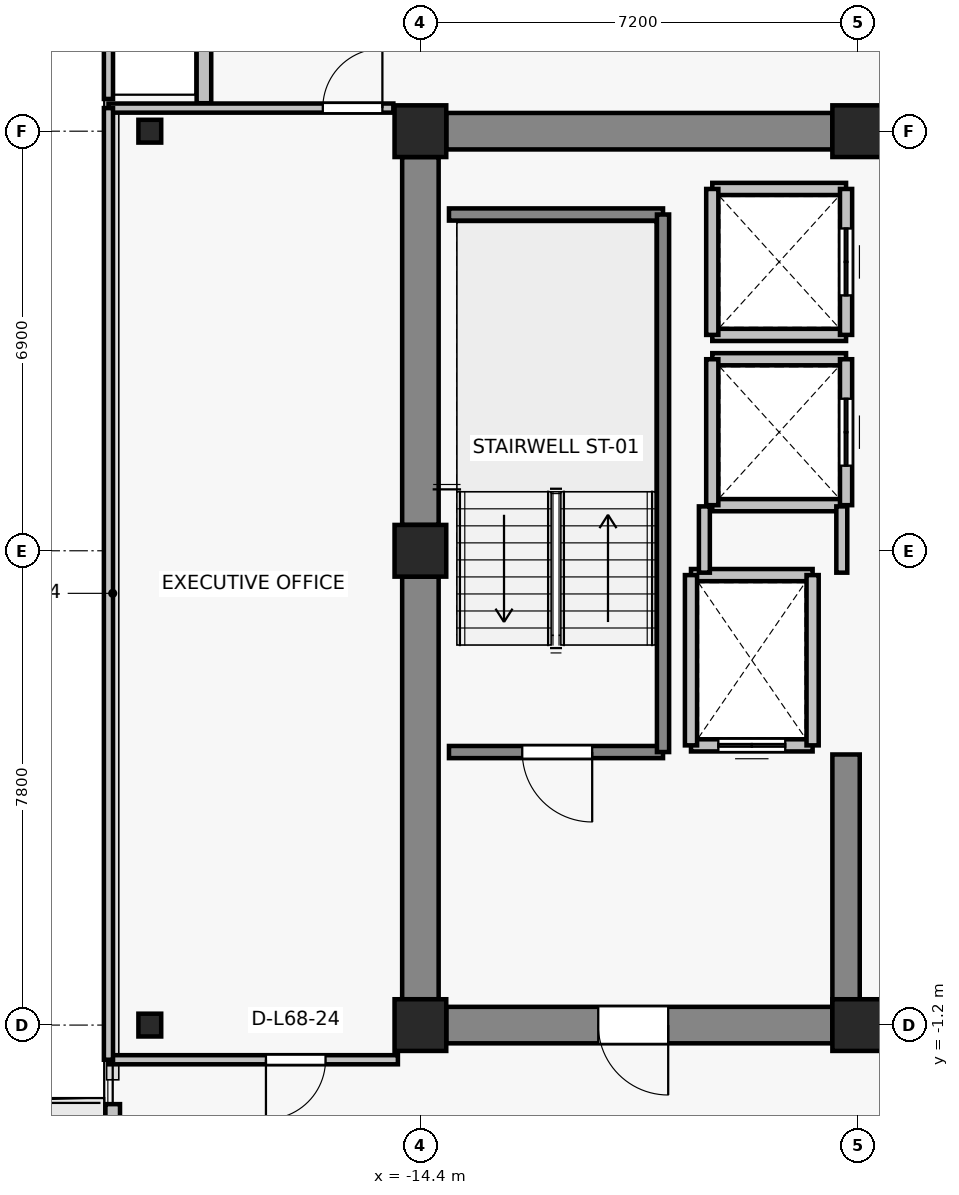
"""IFC4 building model, lengths in metres.
Left out: names, types, materials, properties, quantities, classifications, styles, units other than length and angle.
Written with IfcOpenShell. Run it as: python <this file> out.ifc"""

import sys

from ifc_helpers import new_model, si_unit, direction, frame, frame_2d, origin, origin_2d, place, context, subcontext, project, spatial, rectangle, i_section, extrude, source, transform, mapped, element, fill, save


model = new_model("IFC4")
c1 = context("Model", 3, precision=1e-05, world=origin(), true_north=direction((0.0, 1.0)))
c2 = subcontext(c1, "Body", "Model", "MODEL_VIEW")
j1 = project(units=[si_unit("LENGTHUNIT", "METRE"), si_unit("PLANEANGLEUNIT", "RADIAN")], contexts=[c1])
p1 = place(None, origin())
s1 = spatial("IfcSite", under=j1, at=p1, CompositionType="ELEMENT")
p2 = place(p1, origin())
s2 = spatial("IfcBuilding", under=s1, at=p2, CompositionType="ELEMENT")
p3 = place(p2, frame((0.0, 0.0, 241.9)))
s3 = spatial("IfcBuildingStorey", under=s2, at=p3, CompositionType="ELEMENT", Elevation=241.9)
for number, where, z_axis, x_axis in (
    (1, (-14.4, -1.2, 0.0), (0.0, 0.0, 1.0), (1.0, 0.0, 0.0)),
    (2, (-7.2, -1.2, 0.0), (0.0, 0.0, 1.0), (1.0, 0.0, 0.0)),
    (3, (-14.4, 6.6, 0.0), (0.0, 0.0, 1.0), (1.0, 0.0, 0.0)),
    (4, (-14.4, 13.5, 0.0), (0.0, 0.0, 1.0), (1.0, 0.0, 0.0)),
    (5, (-7.2, 13.5, 0.0), (0.0, 0.0, 1.0), (1.0, 0.0, 0.0)),
):
    element("IfcColumn", number, at=place(p3, frame(where, z_axis=z_axis, x_axis=x_axis)), inside=s3, PredefinedType="COLUMN", context=c2, shape_type="SweptSolid", body=[
        extrude(rectangle(XDim=0.85, YDim=0.85, at=origin_2d()), origin(), (0.0, 0.0, 1.0), 3.3),
    ])
for number, where, z_axis, x_axis in (
    (6, (-18.85, -1.2, 0.0), (0.0, 0.0, 1.0), (1.0, 0.0, 0.0)),
    (7, (-18.85, 13.5, 0.0), (0.0, 0.0, 1.0), (1.0, 0.0, 0.0)),
):
    element("IfcColumn", number, at=place(p3, frame(where, z_axis=z_axis, x_axis=x_axis)), inside=s3, PredefinedType="COLUMN", context=c2, shape_type="SweptSolid", body=[
        extrude(i_section(OverallWidth=0.375, OverallDepth=0.375, WebThickness=0.017, FlangeThickness=0.027, FilletRadius=0.015, at=origin_2d()), origin(), (0.0, 0.0, 1.0), 3.3),
    ])
p4 = place(p3, frame((-13.975, 13.5, 0.0), z_axis=(0.0, 0.0, 1.0), x_axis=(1.0, 0.0, 0.0)))
e8 = element("IfcWall", 8, at=p4, inside=s3, PredefinedType="SHEAR", context=c2, shape_type="SweptSolid", body=[
    extrude(rectangle(XDim=6.35, YDim=0.6, at=frame_2d((3.175, 0.0))), origin(), (0.0, 0.0, 1.0), 3.075),
])
p5 = place(p3, frame((-14.4, -0.775, 0.0), z_axis=(0.0, 0.0, 1.0), x_axis=(0.0, 1.0, 0.0)))
e9 = element("IfcWall", 9, at=p5, inside=s3, PredefinedType="SHEAR", context=c2, shape_type="SweptSolid", body=[
    extrude(rectangle(XDim=6.95, YDim=0.6, at=frame_2d((3.475, 0.0))), origin(), (0.0, 0.0, 1.0), 3.075),
])
p6 = place(p3, frame((-14.4, 7.025, 0.0), z_axis=(0.0, 0.0, 1.0), x_axis=(0.0, 1.0, 0.0)))
e10 = element("IfcWall", 10, at=p6, inside=s3, PredefinedType="SHEAR", context=c2, shape_type="SweptSolid", body=[
    extrude(rectangle(XDim=6.05, YDim=0.6, at=frame_2d((3.025, 0.0))), origin(), (0.0, 0.0, 1.0), 3.075),
])
p7 = place(p3, frame((-7.625, -1.2, 0.0), z_axis=(0.0, 0.0, 1.0), x_axis=(-1.0, 0.0, 0.0)))
e11 = element("IfcWall", 11, at=p7, inside=s3, PredefinedType="SHEAR", context=c2, shape_type="SweptSolid", body=[
    extrude(rectangle(XDim=6.35, YDim=0.6, at=frame_2d((3.175, 0.0))), origin(), (0.0, 0.0, 1.0), 3.075),
])
p8 = place(p7, frame((2.7, 0.0, 0.0)))
e12 = element("IfcOpeningElement", 12, at=p8, cuts=e11, PredefinedType="OPENING", context=c2, shape_type="SweptSolid", body=[
    extrude(rectangle(XDim=1.15, YDim=2.15, at=frame_2d((0.575, 1.075))), frame((0.0, 0.31, 0.0), z_axis=(0.0, -1.0, 0.0), x_axis=(1.0, 0.0, 0.0)), (0.0, 0.0, 1.0), 0.62),
])
p9 = place(p3, frame((-7.4, -0.9, 0.0), z_axis=(0.0, 0.0, 1.0), x_axis=(0.0, 1.0, 0.0)))
e13 = element("IfcWall", 13, at=p9, inside=s3, PredefinedType="SHEAR", context=c2, shape_type="SweptSolid", body=[
    extrude(rectangle(XDim=4.15, YDim=0.45, at=frame_2d((2.075, 0.0))), origin(), (0.0, 0.0, 1.0), 3.075),
])
p10 = place(p3, frame((-19.46, -8.3, 0.0), z_axis=(0.0, 0.0, 1.0), x_axis=(0.0, 1.0, 0.0)))
e14 = element("IfcWall", 14, at=p10, inside=s3, PredefinedType="SOLIDWALL", context=c2, shape_type="SweptSolid", body=[
    extrude(rectangle(XDim=5.8, YDim=0.24, at=frame_2d((2.9, 0.0))), origin(), (0.0, 0.0, 1.0), 3.075),
])
p11 = place(p10, frame((0.696, 0.0, 0.0)))
e15 = element("IfcOpeningElement", 15, at=p11, cuts=e14, PredefinedType="OPENING", context=c2, shape_type="SweptSolid", body=[
    extrude(rectangle(XDim=1.0, YDim=2.2, at=frame_2d((0.5, 1.1))), frame((0.0, 0.13, 0.0), z_axis=(0.0, -1.0, 0.0), x_axis=(1.0, 0.0, 0.0)), (0.0, 0.0, 1.0), 0.26),
])
p12 = place(p10, frame((2.046, 0.0, 0.85)))
e16 = element("IfcOpeningElement", 16, at=p12, cuts=e14, PredefinedType="OPENING", context=c2, shape_type="SweptSolid", body=[
    extrude(rectangle(XDim=0.9, YDim=1.35, at=frame_2d((0.45, 0.675))), frame((0.0, 0.13, 0.0), z_axis=(0.0, -1.0, 0.0), x_axis=(1.0, 0.0, 0.0)), (0.0, 0.0, 1.0), 0.26),
])
p13 = place(p3, frame((-17.96, 15.46, 0.0), z_axis=(0.0, 0.0, 1.0), x_axis=(0.0, -1.0, 0.0)))
e17 = element("IfcWall", 17, at=p13, inside=s3, PredefinedType="SOLIDWALL", context=c2, shape_type="SweptSolid", body=[
    extrude(rectangle(XDim=1.5, YDim=0.24, at=frame_2d((0.75, 0.0))), origin(), (0.0, 0.0, 1.0), 3.075),
])
p14 = place(p3, frame((-7.95, 3.4, 0.0), z_axis=(0.0, 0.0, 1.0), x_axis=(-1.0, 0.0, 0.0)))
e18 = element("IfcWall", 18, at=p14, inside=s3, PredefinedType="SOLIDWALL", context=c2, shape_type="SweptSolid", body=[
    extrude(rectangle(XDim=2.0, YDim=0.2, at=frame_2d((1.0, 0.0))), origin(), (0.0, 0.0, 1.0), 3.075),
])
p15 = place(p14, frame((0.45, 0.0, 0.0)))
e19 = element("IfcOpeningElement", 19, at=p15, cuts=e18, PredefinedType="OPENING", context=c2, shape_type="SweptSolid", body=[
    extrude(rectangle(XDim=1.1, YDim=2.2, at=frame_2d((0.55, 1.1))), frame((0.0, 0.11, 0.0), z_axis=(0.0, -1.0, 0.0), x_axis=(1.0, 0.0, 0.0)), (0.0, 0.0, 1.0), 0.22),
])
p16 = place(p3, frame((-9.95, 6.2, 0.0), z_axis=(0.0, 0.0, 1.0), x_axis=(1.0, 0.0, 0.0)))
e20 = element("IfcWall", 20, at=p16, inside=s3, PredefinedType="SOLIDWALL", context=c2, shape_type="SweptSolid", body=[
    extrude(rectangle(XDim=2.0, YDim=0.2, at=frame_2d((1.0, 0.0))), origin(), (0.0, 0.0, 1.0), 3.075),
])
for number, where, z_axis, x_axis in (
    (21, (-9.95, 3.4, 0.0), (0.0, 0.0, 1.0), (0.0, 1.0, 0.0)),
    (22, (-7.95, 6.2, 0.0), (0.0, 0.0, 1.0), (0.0, -1.0, 0.0)),
):
    element("IfcWall", number, at=place(p3, frame(where, z_axis=z_axis, x_axis=x_axis)), inside=s3, PredefinedType="SOLIDWALL", context=c2, shape_type="SweptSolid", body=[
        extrude(rectangle(XDim=2.8, YDim=0.2, at=frame_2d((1.4, 0.0))), origin(), (0.0, 0.0, 1.0), 3.075),
    ])
for number, where, z_axis, x_axis in (
    (23, (-7.4, 7.35, 0.0), (0.0, 0.0, 1.0), (-1.0, 0.0, 0.0)),
    (24, (-9.6, 9.75, 0.0), (0.0, 0.0, 1.0), (1.0, 0.0, 0.0)),
):
    element("IfcWall", number, at=place(p3, frame(where, z_axis=z_axis, x_axis=x_axis)), inside=s3, PredefinedType="SOLIDWALL", context=c2, shape_type="SweptSolid", body=[
        extrude(rectangle(XDim=2.2, YDim=0.2, at=frame_2d((1.1, 0.0))), origin(), (0.0, 0.0, 1.0), 2.615),
    ])
p17 = place(p3, frame((-9.6, 7.35, 0.0), z_axis=(0.0, 0.0, 1.0), x_axis=(0.0, 1.0, 0.0)))
e25 = element("IfcWall", 25, at=p17, inside=s3, PredefinedType="SOLIDWALL", context=c2, shape_type="SweptSolid", body=[
    extrude(rectangle(XDim=2.4, YDim=0.2, at=frame_2d((1.2, 0.0))), origin(), (0.0, 0.0, 1.0), 3.075),
])
p18 = place(p3, frame((-7.4, 9.75, 0.0), z_axis=(0.0, 0.0, 1.0), x_axis=(0.0, -1.0, 0.0)))
e26 = element("IfcWall", 26, at=p18, inside=s3, PredefinedType="SOLIDWALL", context=c2, shape_type="SweptSolid", body=[
    extrude(rectangle(XDim=2.4, YDim=0.2, at=frame_2d((1.2, 0.0))), origin(), (0.0, 0.0, 1.0), 2.615),
])
p19 = place(p18, frame((0.65, 0.0, 0.0)))
e27 = element("IfcOpeningElement", 27, at=p19, cuts=e26, PredefinedType="OPENING", context=c2, shape_type="SweptSolid", body=[
    extrude(rectangle(XDim=1.1, YDim=2.2, at=frame_2d((0.55, 1.1))), frame((0.0, 0.11, 0.0), z_axis=(0.0, -1.0, 0.0), x_axis=(1.0, 0.0, 0.0)), (0.0, 0.0, 1.0), 0.22),
])
for number, where, z_axis, x_axis in (
    (28, (-7.4, 10.15, 0.0), (0.0, 0.0, 1.0), (-1.0, 0.0, 0.0)),
    (29, (-9.6, 12.55, 0.0), (0.0, 0.0, 1.0), (1.0, 0.0, 0.0)),
):
    element("IfcWall", number, at=place(p3, frame(where, z_axis=z_axis, x_axis=x_axis)), inside=s3, PredefinedType="SOLIDWALL", context=c2, shape_type="SweptSolid", body=[
        extrude(rectangle(XDim=2.2, YDim=0.2, at=frame_2d((1.1, 0.0))), origin(), (0.0, 0.0, 1.0), 2.615),
    ])
p20 = place(p3, frame((-9.6, 10.15, 0.0), z_axis=(0.0, 0.0, 1.0), x_axis=(0.0, 1.0, 0.0)))
e30 = element("IfcWall", 30, at=p20, inside=s3, PredefinedType="SOLIDWALL", context=c2, shape_type="SweptSolid", body=[
    extrude(rectangle(XDim=2.4, YDim=0.2, at=frame_2d((1.2, 0.0))), origin(), (0.0, 0.0, 1.0), 3.075),
])
p21 = place(p3, frame((-7.4, 12.55, 0.0), z_axis=(0.0, 0.0, 1.0), x_axis=(0.0, -1.0, 0.0)))
e31 = element("IfcWall", 31, at=p21, inside=s3, PredefinedType="SOLIDWALL", context=c2, shape_type="SweptSolid", body=[
    extrude(rectangle(XDim=2.4, YDim=0.2, at=frame_2d((1.2, 0.0))), origin(), (0.0, 0.0, 1.0), 2.615),
])
p22 = place(p21, frame((0.65, 0.0, 0.0)))
e32 = element("IfcOpeningElement", 32, at=p22, cuts=e31, PredefinedType="OPENING", context=c2, shape_type="SweptSolid", body=[
    extrude(rectangle(XDim=1.1, YDim=2.2, at=frame_2d((0.55, 1.1))), frame((0.0, 0.11, 0.0), z_axis=(0.0, -1.0, 0.0), x_axis=(1.0, 0.0, 0.0)), (0.0, 0.0, 1.0), 0.22),
])
p23 = place(p3, frame((-10.41, 3.29, 0.0), z_axis=(0.0, 0.0, 1.0), x_axis=(-1.0, 0.0, 0.0)))
e33 = element("IfcWall", 33, at=p23, inside=s3, PredefinedType="SOLIDWALL", context=c2, shape_type="SweptSolid", body=[
    extrude(rectangle(XDim=3.52, YDim=0.2, at=frame_2d((1.76, 0.0))), origin(), (0.0, 0.0, 1.0), 3.075),
])
p24 = place(p23, frame((1.165, 0.0, 0.0)))
e34 = element("IfcOpeningElement", 34, at=p24, cuts=e33, PredefinedType="OPENING", context=c2, shape_type="SweptSolid", body=[
    extrude(rectangle(XDim=1.15, YDim=2.15, at=frame_2d((0.575, 1.075))), frame((0.0, 0.11, 0.0), z_axis=(0.0, -1.0, 0.0), x_axis=(1.0, 0.0, 0.0)), (0.0, 0.0, 1.0), 0.22),
])
p25 = place(p3, frame((-13.93, 12.13, 0.0), z_axis=(0.0, 0.0, 1.0), x_axis=(1.0, 0.0, 0.0)))
e35 = element("IfcWall", 35, at=p25, inside=s3, PredefinedType="SOLIDWALL", context=c2, shape_type="SweptSolid", body=[
    extrude(rectangle(XDim=3.52, YDim=0.2, at=frame_2d((1.76, 0.0))), origin(), (0.0, 0.0, 1.0), 3.075),
])
p26 = place(p3, frame((-10.41, 12.13, 0.0), z_axis=(0.0, 0.0, 1.0), x_axis=(0.0, -1.0, 0.0)))
e36 = element("IfcWall", 36, at=p26, inside=s3, PredefinedType="SOLIDWALL", context=c2, shape_type="SweptSolid", body=[
    extrude(rectangle(XDim=8.84, YDim=0.2, at=frame_2d((4.42, 0.0))), origin(), (0.0, 0.0, 1.0), 3.075),
])
p27 = place(p3, frame((-9.73, 6.24, 0.0), z_axis=(0.0, 0.0, 1.0), x_axis=(0.0, 1.0, 0.0)))
e37 = element("IfcWall", 37, at=p27, inside=s3, PredefinedType="PARTITIONING", context=c2, shape_type="SweptSolid", body=[
    extrude(rectangle(XDim=1.09, YDim=0.18, at=frame_2d((0.545, 0.0))), origin(), (0.0, 0.0, 1.0), 3.075),
])
p28 = place(p3, frame((-7.47, 7.33, 0.0), z_axis=(0.0, 0.0, 1.0), x_axis=(0.0, -1.0, 0.0)))
e38 = element("IfcWall", 38, at=p28, inside=s3, PredefinedType="PARTITIONING", context=c2, shape_type="SweptSolid", body=[
    extrude(rectangle(XDim=1.09, YDim=0.18, at=frame_2d((0.545, 0.0))), origin(), (0.0, 0.0, 1.0), 2.615),
])
p29 = place(p3, frame((-14.77, -1.77, 0.0), z_axis=(0.0, 0.0, 1.0), x_axis=(-1.0, 0.0, 0.0)))
e39 = element("IfcWall", 39, at=p29, inside=s3, PredefinedType="PARTITIONING", context=c2, shape_type="SweptSolid", body=[
    extrude(rectangle(XDim=4.76, YDim=0.15, at=frame_2d((2.38, 0.0))), origin(), (0.0, 0.0, 1.0), 2.765),
])
p30 = place(p29, frame((1.19, 0.0, 0.0)))
e40 = element("IfcOpeningElement", 40, at=p30, cuts=e39, PredefinedType="OPENING", context=c2, shape_type="SweptSolid", body=[
    extrude(rectangle(XDim=0.98, YDim=2.15, at=frame_2d((0.49, 1.075))), frame((0.0, 0.085, 0.0), z_axis=(0.0, -1.0, 0.0), x_axis=(1.0, 0.0, 0.0)), (0.0, 0.0, 1.0), 0.17),
])
p31 = place(p3, frame((-19.53, 13.88, 0.0), z_axis=(0.0, 0.0, 1.0), x_axis=(1.0, 0.0, 0.0)))
e41 = element("IfcWall", 41, at=p31, inside=s3, PredefinedType="PARTITIONING", context=c2, shape_type="SweptSolid", body=[
    extrude(rectangle(XDim=4.685, YDim=0.15, at=frame_2d((2.343, 0.0))), origin(), (0.0, 0.0, 1.0), 3.075),
])
p32 = place(p31, frame((3.525, 0.0, 0.0)))
e42 = element("IfcOpeningElement", 42, at=p32, cuts=e41, PredefinedType="OPENING", context=c2, shape_type="SweptSolid", body=[
    extrude(rectangle(XDim=0.98, YDim=2.15, at=frame_2d((0.49, 1.075))), frame((0.0, 0.085, 0.0), z_axis=(0.0, -1.0, 0.0), x_axis=(1.0, 0.0, 0.0)), (0.0, 0.0, 1.0), 0.17),
])
p33 = place(p3, frame((-19.53, -1.77, 0.0), z_axis=(0.0, 0.0, 1.0), x_axis=(0.0, 1.0, 0.0)))
e43 = element("IfcWall", 43, at=p33, inside=s3, PredefinedType="PARTITIONING", context=c2, shape_type="SweptSolid", body=[
    extrude(rectangle(XDim=15.65, YDim=0.15, at=frame_2d((7.825, 0.0))), origin(), (0.0, 0.0, 1.0), 3.075),
])
p34 = place(p3, frame((-19.53, 14.03, 0.0), z_axis=(0.0, 0.0, 1.0), x_axis=(0.0, 1.0, 0.0)))
e44 = element("IfcWall", 44, at=p34, inside=s3, PredefinedType="PARTITIONING", context=c2, shape_type="SweptSolid", body=[
    extrude(rectangle(XDim=3.0, YDim=0.15, at=frame_2d((1.5, 0.0))), origin(), (0.0, 0.0, 1.0), 3.075),
])
m1 = source(origin(), c2, "Body", "SweptSolid", [
    extrude(rectangle(XDim=1.1, YDim=2.2, at=frame_2d((0.55, 1.1))), frame((0.0, 0.025, 0.0), z_axis=(0.0, -1.0, 0.0), x_axis=(1.0, 0.0, 0.0)), (0.0, 0.0, 1.0), 0.05),
])
p35 = place(p15, origin())
e45 = element("IfcDoor", 45, at=p35, inside=s3, OperationType="DOUBLE_DOOR_SLIDING", PredefinedType="DOOR", context=c2, shape_type="MappedRepresentation", body=[
    mapped(m1, transform((0.0, 0.0, 0.0), x_axis=(1.0, 0.0, 0.0), y_axis=(0.0, 1.0, 0.0), z_axis=(0.0, 0.0, 1.0), scale=1.0)),
])
fill(e19, e45)
p36 = place(p19, origin())
e46 = element("IfcDoor", 46, at=p36, inside=s3, OperationType="DOUBLE_DOOR_SLIDING", PredefinedType="DOOR", context=c2, shape_type="MappedRepresentation", body=[
    mapped(m1, transform((0.0, 0.0, 0.0), x_axis=(1.0, 0.0, 0.0), y_axis=(0.0, 1.0, 0.0), z_axis=(0.0, 0.0, 1.0), scale=1.0)),
])
fill(e27, e46)
p37 = place(p22, origin())
e47 = element("IfcDoor", 47, at=p37, inside=s3, OperationType="DOUBLE_DOOR_SLIDING", PredefinedType="DOOR", context=c2, shape_type="MappedRepresentation", body=[
    mapped(m1, transform((0.0, 0.0, 0.0), x_axis=(1.0, 0.0, 0.0), y_axis=(0.0, 1.0, 0.0), z_axis=(0.0, 0.0, 1.0), scale=1.0)),
])
fill(e32, e47)
m2 = source(origin(), c2, "Body", "SweptSolid", [
    extrude(rectangle(XDim=1.15, YDim=2.15, at=frame_2d((0.575, 1.075))), frame((0.0, 0.025, 0.0), z_axis=(0.0, -1.0, 0.0), x_axis=(1.0, 0.0, 0.0)), (0.0, 0.0, 1.0), 0.05),
])
p38 = place(p24, origin())
e48 = element("IfcDoor", 48, at=p38, inside=s3, OperationType="SINGLE_SWING_LEFT", PredefinedType="DOOR", context=c2, shape_type="MappedRepresentation", body=[
    mapped(m2, transform((0.0, 0.0, 0.0), x_axis=(1.0, 0.0, 0.0), y_axis=(0.0, 1.0, 0.0), z_axis=(0.0, 0.0, 1.0), scale=1.0)),
])
fill(e34, e48)
p39 = place(p8, origin())
e49 = element("IfcDoor", 49, at=p39, inside=s3, OperationType="SINGLE_SWING_LEFT", PredefinedType="DOOR", context=c2, shape_type="MappedRepresentation", body=[
    mapped(m2, transform((0.0, 0.0, 0.0), x_axis=(1.0, 0.0, 0.0), y_axis=(0.0, 1.0, 0.0), z_axis=(0.0, 0.0, 1.0), scale=1.0)),
])
fill(e12, e49)
m3 = source(origin(), c2, "Body", "SweptSolid", [
    extrude(rectangle(XDim=0.98, YDim=2.15, at=frame_2d((0.49, 1.075))), frame((0.0, 0.025, 0.0), z_axis=(0.0, -1.0, 0.0), x_axis=(1.0, 0.0, 0.0)), (0.0, 0.0, 1.0), 0.05),
])
p40 = place(p30, origin())
e50 = element("IfcDoor", 50, at=p40, inside=s3, OperationType="SINGLE_SWING_RIGHT", PredefinedType="DOOR", context=c2, shape_type="MappedRepresentation", body=[
    mapped(m3, transform((0.0, 0.0, 0.0), x_axis=(1.0, 0.0, 0.0), y_axis=(0.0, 1.0, 0.0), z_axis=(0.0, 0.0, 1.0), scale=1.0)),
])
fill(e40, e50)
p41 = place(p32, origin())
e51 = element("IfcDoor", 51, at=p41, inside=s3, OperationType="SINGLE_SWING_RIGHT", PredefinedType="DOOR", context=c2, shape_type="MappedRepresentation", body=[
    mapped(m3, transform((0.0, 0.0, 0.0), x_axis=(1.0, 0.0, 0.0), y_axis=(0.0, 1.0, 0.0), z_axis=(0.0, 0.0, 1.0), scale=1.0)),
])
fill(e42, e51)
save(model, sys.argv[1])
